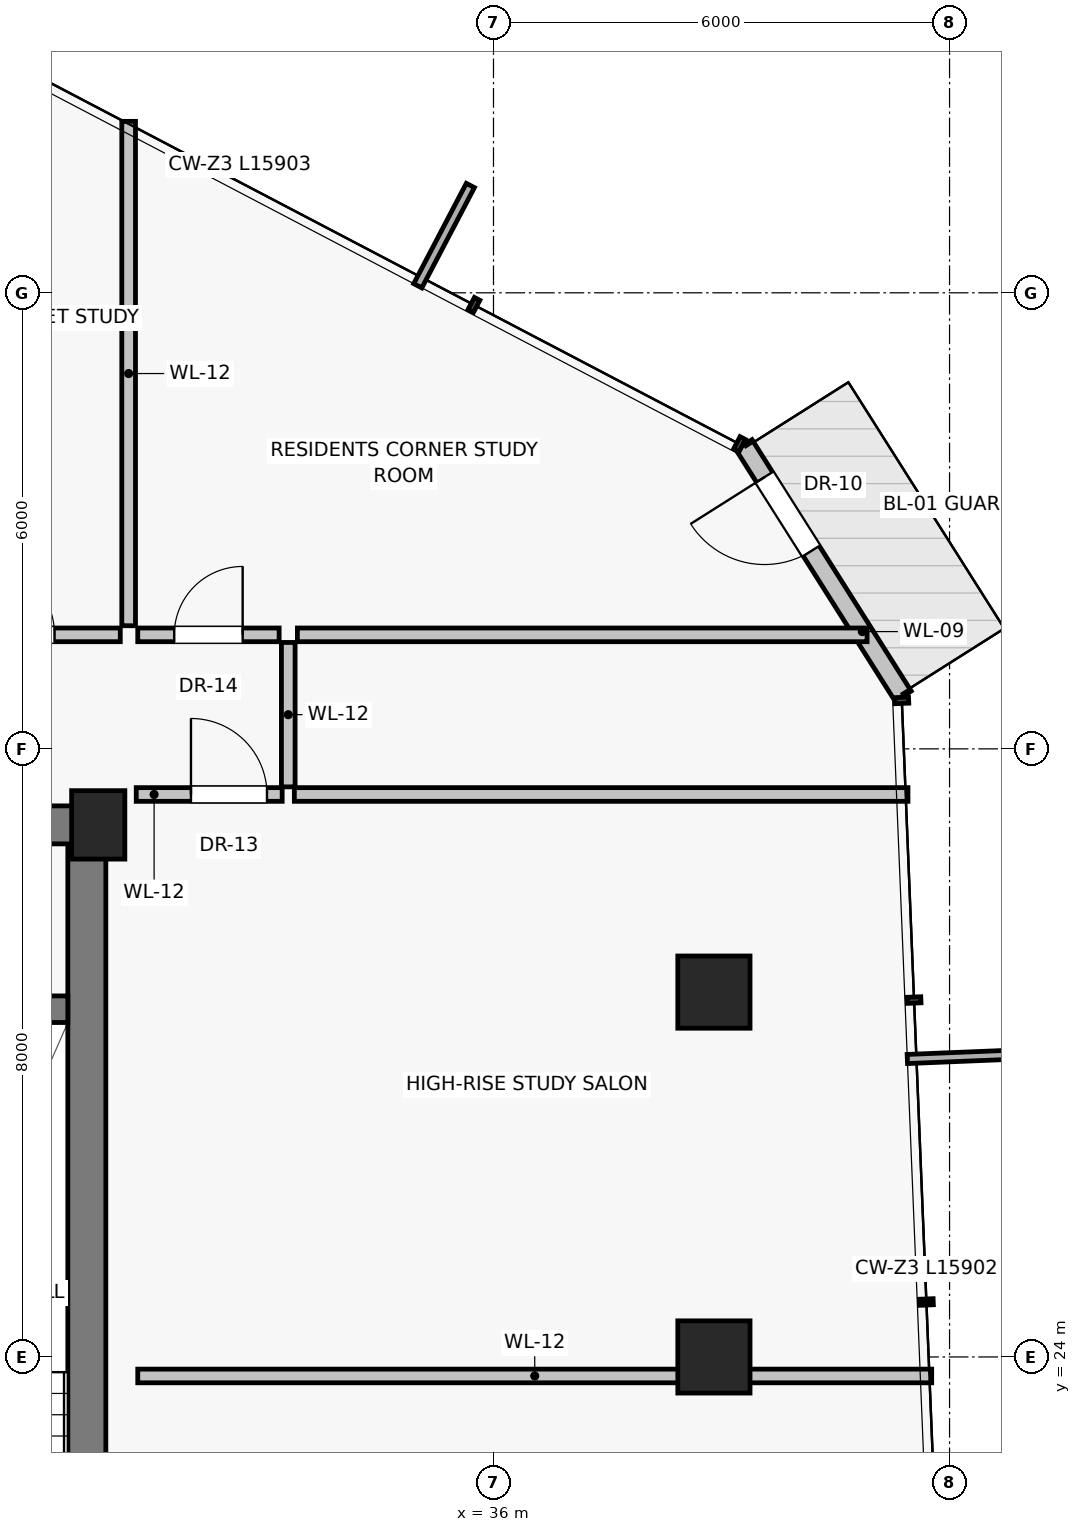
"""IFC4 building model, lengths in metres.
Left out: names, types, materials, properties, quantities, classifications, styles, units other than length and angle.
Written with IfcOpenShell. Run it as: python <this file> out.ifc"""

import sys

from ifc_helpers import new_model, si_unit, direction, frame, frame_2d, origin, origin_2d, place, context, subcontext, project, spatial, rectangle, extrude, source, transform, mapped, element, fill, save


model = new_model("IFC4")
c1 = context("Model", 3, precision=1e-05, world=origin(), true_north=direction((0.0, 1.0)))
c2 = subcontext(c1, "Body", "Model", "MODEL_VIEW")
j1 = project(units=[si_unit("LENGTHUNIT", "METRE"), si_unit("PLANEANGLEUNIT", "RADIAN")], contexts=[c1])
p1 = place(None, origin())
s1 = spatial("IfcSite", under=j1, at=p1, CompositionType="ELEMENT")
p2 = place(p1, origin())
s2 = spatial("IfcBuilding", under=s1, at=p2, CompositionType="ELEMENT")
p3 = place(p2, frame((0.0, 0.0, 198.35)))
s3 = spatial("IfcBuildingStorey", under=s2, at=p3, CompositionType="ELEMENT", Elevation=198.35)
p4 = place(p3, frame((30.8, 31.0, 0.0), z_axis=(0.0, 0.0, 1.0), x_axis=(1.0, 0.0, 0.0)))
e1 = element("IfcColumn", 1, at=p4, inside=s3, PredefinedType="PILASTER", context=c2, shape_type="SweptSolid", body=[
    extrude(rectangle(XDim=0.7, YDim=0.9, at=origin_2d()), origin(), (0.0, 0.0, 1.0), 3.25),
])
for number, where, z_axis, x_axis in (
    (2, (38.9, 24.0, 0.0), (0.0, 0.0, 1.0), (1.0, 0.0, 0.0)),
    (3, (38.9, 28.8, 0.0), (0.0, 0.0, 1.0), (1.0, 0.0, 0.0)),
):
    element("IfcColumn", number, at=place(p3, frame(where, z_axis=z_axis, x_axis=x_axis)), inside=s3, PredefinedType="COLUMN", context=c2, shape_type="SweptSolid", body=[
        extrude(rectangle(XDim=0.95, YDim=0.95, at=origin_2d()), origin(), (0.0, 0.0, 1.0), 3.25),
    ])
p5 = place(p3, frame((41.39, 32.694, 0.0), z_axis=(0.0, 0.0, 1.0), x_axis=(-0.534928922518, 0.844897063466, 0.0)))
e4 = element("IfcWall", 4, at=p5, inside=s3, PredefinedType="SOLIDWALL", context=c2, shape_type="SweptSolid", body=[
    extrude(rectangle(XDim=3.915, YDim=0.25, at=frame_2d((1.957, 0.0))), origin(), (0.0, 0.0, 1.0), 3.015),
])
p6 = place(p5, frame((2.26, 0.0, 0.0)))
e5 = element("IfcOpeningElement", 5, at=p6, cuts=e4, PredefinedType="OPENING", context=c2, shape_type="SweptSolid", body=[
    extrude(rectangle(XDim=1.15, YDim=2.25, at=frame_2d((0.575, 1.125))), frame((0.0, 0.135, 0.0), z_axis=(0.0, -1.0, 0.0), x_axis=(1.0, 0.0, 0.0)), (0.0, 0.0, 1.0), 0.27),
])
p7 = place(p3, frame((30.65, 16.8, 0.0), z_axis=(0.0, 0.0, 1.0), x_axis=(0.0, 1.0, 0.0)))
e6 = element("IfcWall", 6, at=p7, inside=s3, PredefinedType="SHEAR", context=c2, shape_type="SweptSolid", body=[
    extrude(rectangle(XDim=14.2, YDim=0.5, at=frame_2d((7.1, 0.0))), origin(), (0.0, 0.0, 1.0), 3.015),
])
p8 = place(p3, frame((27.0, 31.0, 0.0), z_axis=(0.0, 0.0, 1.0), x_axis=(1.0, 0.0, 0.0)))
e7 = element("IfcWall", 7, at=p8, inside=s3, PredefinedType="SHEAR", context=c2, shape_type="SweptSolid", body=[
    extrude(rectangle(XDim=3.8, YDim=0.5, at=frame_2d((1.9, 0.0))), origin(), (0.0, 0.0, 1.0), 3.015),
])
p9 = place(p8, frame((0.45, 0.0, 0.0)))
e8 = element("IfcOpeningElement", 8, at=p9, cuts=e7, PredefinedType="OPENING", context=c2, shape_type="SweptSolid", body=[
    extrude(rectangle(XDim=0.86, YDim=2.01, at=frame_2d((0.43, 1.005))), frame((0.0, 0.26, 0.0), z_axis=(0.0, -1.0, 0.0), x_axis=(1.0, 0.0, 0.0)), (0.0, 0.0, 1.0), 0.52),
])
p10 = place(p8, frame((1.9, 0.0, 0.0)))
e9 = element("IfcOpeningElement", 9, at=p10, cuts=e7, PredefinedType="OPENING", context=c2, shape_type="SweptSolid", body=[
    extrude(rectangle(XDim=0.86, YDim=2.01, at=frame_2d((0.43, 1.005))), frame((0.0, 0.26, 0.0), z_axis=(0.0, -1.0, 0.0), x_axis=(1.0, 0.0, 0.0)), (0.0, 0.0, 1.0), 0.52),
])
p11 = place(p3, frame((27.025, 28.575, 0.0), z_axis=(0.0, 0.0, 1.0), x_axis=(1.0, 0.0, 0.0)))
e10 = element("IfcWall", 10, at=p11, inside=s3, PredefinedType="SHEAR", context=c2, shape_type="SweptSolid", body=[
    extrude(rectangle(XDim=3.375, YDim=0.35, at=frame_2d((1.688, 0.0))), origin(), (0.0, 0.0, 1.0), 3.015),
])
p12 = place(p3, frame((31.2, 33.62, 0.0), z_axis=(0.0, 0.0, 1.0), x_axis=(0.0, 1.0, 0.0)))
e11 = element("IfcWall", 11, at=p12, inside=s3, PredefinedType="PARTITIONING", context=c2, shape_type="SweptSolid", body=[
    extrude(rectangle(XDim=6.635, YDim=0.18, at=frame_2d((3.318, 0.0))), origin(), (0.0, 0.0, 1.0), 3.015),
])
p13 = place(p3, frame((28.36, 33.5, 0.0), z_axis=(0.0, 0.0, 1.0), x_axis=(1.0, 0.0, 0.0)))
e12 = element("IfcWall", 12, at=p13, inside=s3, PredefinedType="PARTITIONING", context=c2, shape_type="SweptSolid", body=[
    extrude(rectangle(XDim=2.73, YDim=0.18, at=frame_2d((1.365, 0.0))), origin(), (0.0, 0.0, 1.0), 3.015),
])
p14 = place(p13, frame((0.865, 0.0, 0.0)))
e13 = element("IfcOpeningElement", 13, at=p14, cuts=e12, PredefinedType="OPENING", context=c2, shape_type="SweptSolid", body=[
    extrude(rectangle(XDim=1.0, YDim=2.01, at=frame_2d((0.5, 1.005))), frame((0.0, 0.1, 0.0), z_axis=(0.0, -1.0, 0.0), x_axis=(1.0, 0.0, 0.0)), (0.0, 0.0, 1.0), 0.2),
])
p15 = place(p3, frame((31.32, 23.75, 0.0), z_axis=(0.0, 0.0, 1.0), x_axis=(1.0, 0.0, 0.0)))
e14 = element("IfcWall", 14, at=p15, inside=s3, PredefinedType="PARTITIONING", context=c2, shape_type="SweptSolid", body=[
    extrude(rectangle(XDim=10.445, YDim=0.18, at=frame_2d((5.223, 0.0))), origin(), (0.0, 0.0, 1.0), 3.015),
])
p16 = place(p3, frame((33.3, 31.5, 0.0), z_axis=(0.0, 0.0, 1.0), x_axis=(0.0, 1.0, 0.0)))
e15 = element("IfcWall", 15, at=p16, inside=s3, PredefinedType="PARTITIONING", context=c2, shape_type="SweptSolid", body=[
    extrude(rectangle(XDim=1.9, YDim=0.18, at=frame_2d((0.95, 0.0))), origin(), (0.0, 0.0, 1.0), 3.015),
])
p17 = place(p3, frame((31.3, 31.4, 0.0), z_axis=(0.0, 0.0, 1.0), x_axis=(1.0, 0.0, 0.0)))
e16 = element("IfcWall", 16, at=p17, inside=s3, PredefinedType="PARTITIONING", context=c2, shape_type="SweptSolid", body=[
    extrude(rectangle(XDim=1.92, YDim=0.18, at=frame_2d((0.96, 0.0))), origin(), (0.0, 0.0, 1.0), 3.015),
])
p18 = place(p17, frame((0.72, 0.0, 0.0)))
e17 = element("IfcOpeningElement", 17, at=p18, cuts=e16, PredefinedType="OPENING", context=c2, shape_type="SweptSolid", body=[
    extrude(rectangle(XDim=1.0, YDim=2.01, at=frame_2d((0.5, 1.005))), frame((0.0, 0.1, 0.0), z_axis=(0.0, -1.0, 0.0), x_axis=(1.0, 0.0, 0.0)), (0.0, 0.0, 1.0), 0.2),
])
p19 = place(p3, frame((33.38, 31.4, 0.0), z_axis=(0.0, 0.0, 1.0), x_axis=(1.0, 0.0, 0.0)))
e18 = element("IfcWall", 18, at=p19, inside=s3, PredefinedType="PARTITIONING", context=c2, shape_type="SweptSolid", body=[
    extrude(rectangle(XDim=8.073, YDim=0.18, at=frame_2d((4.036, 0.0))), origin(), (0.0, 0.0, 1.0), 3.015),
])
p20 = place(p3, frame((33.42, 33.5, 0.0), z_axis=(0.0, 0.0, 1.0), x_axis=(1.0, 0.0, 0.0)))
e19 = element("IfcWall", 19, at=p20, inside=s3, PredefinedType="PARTITIONING", context=c2, shape_type="SweptSolid", body=[
    extrude(rectangle(XDim=7.495, YDim=0.18, at=frame_2d((3.748, 0.0))), origin(), (0.0, 0.0, 1.0), 3.015),
])
p21 = place(p3, frame((31.32, 33.5, 0.0), z_axis=(0.0, 0.0, 1.0), x_axis=(1.0, 0.0, 0.0)))
e20 = element("IfcWall", 20, at=p21, inside=s3, PredefinedType="PARTITIONING", context=c2, shape_type="SweptSolid", body=[
    extrude(rectangle(XDim=1.86, YDim=0.18, at=frame_2d((0.93, 0.0))), origin(), (0.0, 0.0, 1.0), 3.015),
])
p22 = place(p21, frame((0.48, 0.0, 0.0)))
e21 = element("IfcOpeningElement", 21, at=p22, cuts=e20, PredefinedType="OPENING", context=c2, shape_type="SweptSolid", body=[
    extrude(rectangle(XDim=0.9, YDim=2.01, at=frame_2d((0.45, 1.005))), frame((0.0, 0.1, 0.0), z_axis=(0.0, -1.0, 0.0), x_axis=(1.0, 0.0, 0.0)), (0.0, 0.0, 1.0), 0.2),
])
m1 = source(origin(), c2, "Body", "SweptSolid", [
    extrude(rectangle(XDim=1.15, YDim=2.25, at=frame_2d((0.575, 1.125))), frame((0.0, 0.025, 0.0), z_axis=(0.0, -1.0, 0.0), x_axis=(1.0, 0.0, 0.0)), (0.0, 0.0, 1.0), 0.05),
])
p23 = place(p6, frame((1.15, 0.0, 0.0), z_axis=(0.0, 0.0, 1.0), x_axis=(-1.0, 0.0, 0.0)))
e22 = element("IfcDoor", 22, at=p23, inside=s3, OperationType="SINGLE_SWING_RIGHT", PredefinedType="DOOR", context=c2, shape_type="MappedRepresentation", body=[
    mapped(m1, transform((0.0, 0.0, 0.0), scale=1.0)),
])
fill(e5, e22)
m2 = source(origin(), c2, "Body", "SweptSolid", [
    extrude(rectangle(XDim=1.0, YDim=2.01, at=frame_2d((0.5, 1.005))), frame((0.0, 0.025, 0.0), z_axis=(0.0, -1.0, 0.0), x_axis=(1.0, 0.0, 0.0)), (0.0, 0.0, 1.0), 0.05),
])
p24 = place(p14, origin())
e23 = element("IfcDoor", 23, at=p24, inside=s3, OperationType="SINGLE_SWING_LEFT", PredefinedType="DOOR", context=c2, shape_type="MappedRepresentation", body=[
    mapped(m2, transform((0.0, 0.0, 0.0), scale=1.0)),
])
fill(e13, e23)
p25 = place(p18, origin())
e24 = element("IfcDoor", 24, at=p25, inside=s3, OperationType="SINGLE_SWING_LEFT", PredefinedType="DOOR", context=c2, shape_type="MappedRepresentation", body=[
    mapped(m2, transform((0.0, 0.0, 0.0), scale=1.0)),
])
fill(e17, e24)
m3 = source(origin(), c2, "Body", "SweptSolid", [
    extrude(rectangle(XDim=0.9, YDim=2.01, at=frame_2d((0.45, 1.005))), frame((0.0, 0.025, 0.0), z_axis=(0.0, -1.0, 0.0), x_axis=(1.0, 0.0, 0.0)), (0.0, 0.0, 1.0), 0.05),
])
p26 = place(p22, origin())
e25 = element("IfcDoor", 25, at=p26, inside=s3, OperationType="SINGLE_SWING_RIGHT", PredefinedType="DOOR", context=c2, shape_type="MappedRepresentation", body=[
    mapped(m3, transform((0.0, 0.0, 0.0), scale=1.0)),
])
fill(e21, e25)
save(model, sys.argv[1])
